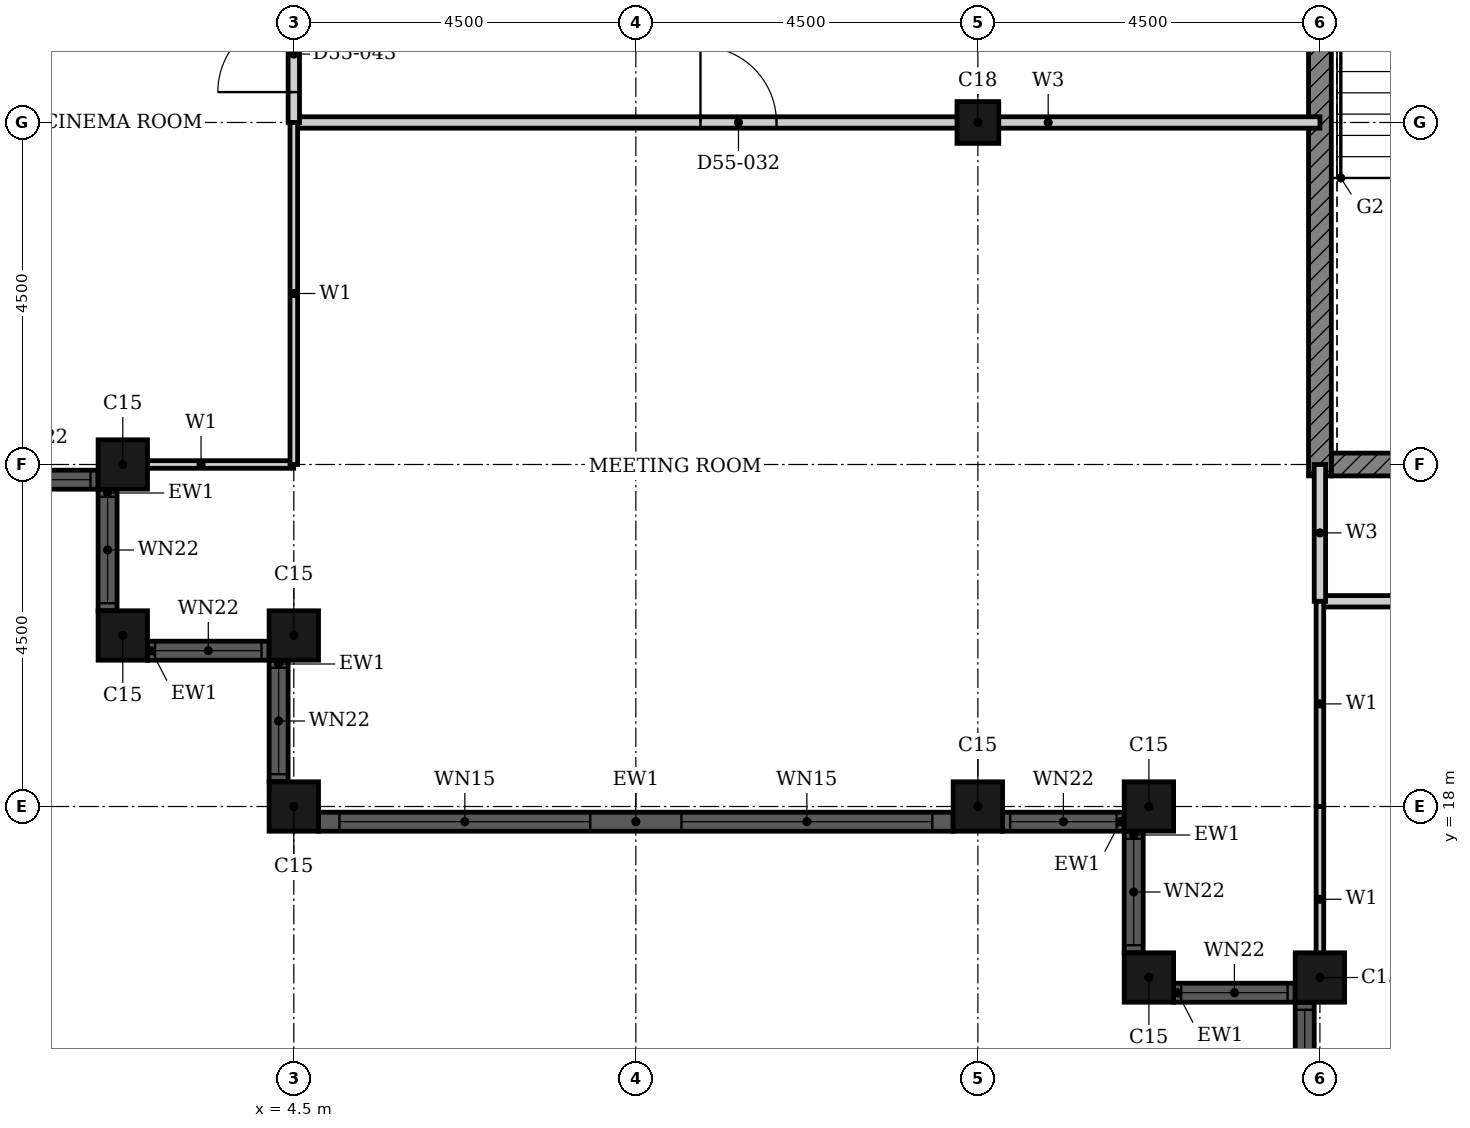
"""IFC4 building model, lengths in metres.
Left out: names, types, materials, properties, quantities, classifications, styles, units other than length and angle.
Written with IfcOpenShell. Run it as: python <this file> out.ifc"""

import sys

from ifc_helpers import new_model, si_unit, direction, frame, frame_2d, origin, origin_2d, place, context, subcontext, project, spatial, rectangle, hollow_rectangle, extrude, element, fill, save


model = new_model("IFC4")
c1 = context("Model", 3, precision=1e-05, world=origin(), true_north=direction((0.0, 1.0)))
c2 = subcontext(c1, "Body", "Model", "MODEL_VIEW")
j1 = project(units=[si_unit("LENGTHUNIT", "METRE"), si_unit("PLANEANGLEUNIT", "RADIAN")], contexts=[c1])
p1 = place(None, origin())
s1 = spatial("IfcSite", under=j1, at=p1, CompositionType="ELEMENT")
p2 = place(p1, origin())
s2 = spatial("IfcBuilding", under=s1, at=p2, CompositionType="ELEMENT")
p3 = place(p2, frame((0.0, 0.0, 218.3)))
s3 = spatial("IfcBuildingStorey", under=s2, at=p3, CompositionType="ELEMENT", Elevation=218.3)
for number, where, z_axis, x_axis in (
    (1, (2.25, 22.5, 0.0), (0.0, 0.0, 1.0), (1.0, 0.0, 0.0)),
    (2, (2.25, 20.25, 0.0), (0.0, 0.0, 1.0), (1.0, 0.0, 0.0)),
    (3, (4.5, 20.25, 0.0), (0.0, 0.0, 1.0), (1.0, 0.0, 0.0)),
    (4, (4.5, 18.0, 0.0), (0.0, 0.0, 1.0), (1.0, 0.0, 0.0)),
    (5, (13.5, 18.0, 0.0), (0.0, 0.0, 1.0), (1.0, 0.0, 0.0)),
    (6, (15.75, 18.0, 0.0), (0.0, 0.0, 1.0), (1.0, 0.0, 0.0)),
    (7, (15.75, 15.75, 0.0), (0.0, 0.0, 1.0), (1.0, 0.0, 0.0)),
    (8, (18.0, 15.75, 0.0), (0.0, 0.0, 1.0), (1.0, 0.0, 0.0)),
):
    element("IfcColumn", number, at=place(p3, frame(where, z_axis=z_axis, x_axis=x_axis)), inside=s3, PredefinedType="COLUMN", context=c2, shape_type="SweptSolid", body=[
        extrude(hollow_rectangle(XDim=0.65, YDim=0.65, WallThickness=0.021, at=origin_2d()), origin(), (0.0, 0.0, 1.0), 3.7),
    ])
p4 = place(p3, frame((13.5, 27.0, 0.0), z_axis=(0.0, 0.0, 1.0), x_axis=(1.0, 0.0, 0.0)))
e9 = element("IfcColumn", 9, at=p4, inside=s3, PredefinedType="COLUMN", context=c2, shape_type="SweptSolid", body=[
    extrude(hollow_rectangle(XDim=0.55, YDim=0.55, WallThickness=0.018, at=origin_2d()), origin(), (0.0, 0.0, 1.0), 3.7),
])
p5 = place(p3, frame((0.325, 22.3, 0.0), z_axis=(0.0, 0.0, 1.0), x_axis=(1.0, 0.0, 0.0)))
e10 = element("IfcWall", 10, at=p5, inside=s3, PredefinedType="SOLIDWALL", context=c2, shape_type="SweptSolid", body=[
    extrude(rectangle(XDim=1.6, YDim=0.25, at=frame_2d((0.8, 0.0))), origin(), (0.0, 0.0, 1.0), 3.7),
])
p6 = place(p5, frame((0.1, 0.0, 0.9)))
e11 = element("IfcOpeningElement", 11, at=p6, cuts=e10, PredefinedType="OPENING", context=c2, shape_type="SweptSolid", body=[
    extrude(rectangle(XDim=1.4, YDim=1.85, at=frame_2d((0.7, 0.925))), frame((0.0, 0.135, 0.0), z_axis=(0.0, -1.0, 0.0), x_axis=(1.0, 0.0, 0.0)), (0.0, 0.0, 1.0), 0.27),
])
p7 = place(p3, frame((2.05, 22.175, 0.0), z_axis=(0.0, 0.0, 1.0), x_axis=(0.0, -1.0, 0.0)))
e12 = element("IfcWall", 12, at=p7, inside=s3, PredefinedType="SOLIDWALL", context=c2, shape_type="SweptSolid", body=[
    extrude(rectangle(XDim=1.6, YDim=0.25, at=frame_2d((0.8, 0.0))), origin(), (0.0, 0.0, 1.0), 3.7),
])
p8 = place(p7, frame((0.1, 0.0, 0.9)))
e13 = element("IfcOpeningElement", 13, at=p8, cuts=e12, PredefinedType="OPENING", context=c2, shape_type="SweptSolid", body=[
    extrude(rectangle(XDim=1.4, YDim=1.85, at=frame_2d((0.7, 0.925))), frame((0.0, 0.135, 0.0), z_axis=(0.0, -1.0, 0.0), x_axis=(1.0, 0.0, 0.0)), (0.0, 0.0, 1.0), 0.27),
])
p9 = place(p3, frame((2.575, 20.05, 0.0), z_axis=(0.0, 0.0, 1.0), x_axis=(1.0, 0.0, 0.0)))
e14 = element("IfcWall", 14, at=p9, inside=s3, PredefinedType="SOLIDWALL", context=c2, shape_type="SweptSolid", body=[
    extrude(rectangle(XDim=1.6, YDim=0.25, at=frame_2d((0.8, 0.0))), origin(), (0.0, 0.0, 1.0), 3.7),
])
p10 = place(p9, frame((0.1, 0.0, 0.9)))
e15 = element("IfcOpeningElement", 15, at=p10, cuts=e14, PredefinedType="OPENING", context=c2, shape_type="SweptSolid", body=[
    extrude(rectangle(XDim=1.4, YDim=1.85, at=frame_2d((0.7, 0.925))), frame((0.0, 0.135, 0.0), z_axis=(0.0, -1.0, 0.0), x_axis=(1.0, 0.0, 0.0)), (0.0, 0.0, 1.0), 0.27),
])
p11 = place(p3, frame((4.3, 19.925, 0.0), z_axis=(0.0, 0.0, 1.0), x_axis=(0.0, -1.0, 0.0)))
e16 = element("IfcWall", 16, at=p11, inside=s3, PredefinedType="SOLIDWALL", context=c2, shape_type="SweptSolid", body=[
    extrude(rectangle(XDim=1.6, YDim=0.25, at=frame_2d((0.8, 0.0))), origin(), (0.0, 0.0, 1.0), 3.7),
])
p12 = place(p11, frame((0.1, 0.0, 0.9)))
e17 = element("IfcOpeningElement", 17, at=p12, cuts=e16, PredefinedType="OPENING", context=c2, shape_type="SweptSolid", body=[
    extrude(rectangle(XDim=1.4, YDim=1.85, at=frame_2d((0.7, 0.925))), frame((0.0, 0.135, 0.0), z_axis=(0.0, -1.0, 0.0), x_axis=(1.0, 0.0, 0.0)), (0.0, 0.0, 1.0), 0.27),
])
p13 = place(p3, frame((4.825, 17.8, 0.0), z_axis=(0.0, 0.0, 1.0), x_axis=(1.0, 0.0, 0.0)))
e18 = element("IfcWall", 18, at=p13, inside=s3, PredefinedType="SOLIDWALL", context=c2, shape_type="SweptSolid", body=[
    extrude(rectangle(XDim=8.35, YDim=0.25, at=frame_2d((4.175, 0.0))), origin(), (0.0, 0.0, 1.0), 3.7),
])
p14 = place(p13, frame((0.275, 0.0, 0.45)))
e19 = element("IfcOpeningElement", 19, at=p14, cuts=e18, PredefinedType="OPENING", context=c2, shape_type="SweptSolid", body=[
    extrude(rectangle(XDim=3.3, YDim=2.3, at=frame_2d((1.65, 1.15))), frame((0.0, 0.135, 0.0), z_axis=(0.0, -1.0, 0.0), x_axis=(1.0, 0.0, 0.0)), (0.0, 0.0, 1.0), 0.27),
])
p15 = place(p13, frame((4.775, 0.0, 0.45)))
e20 = element("IfcOpeningElement", 20, at=p15, cuts=e18, PredefinedType="OPENING", context=c2, shape_type="SweptSolid", body=[
    extrude(rectangle(XDim=3.3, YDim=2.3, at=frame_2d((1.65, 1.15))), frame((0.0, 0.135, 0.0), z_axis=(0.0, -1.0, 0.0), x_axis=(1.0, 0.0, 0.0)), (0.0, 0.0, 1.0), 0.27),
])
p16 = place(p3, frame((13.825, 17.8, 0.0), z_axis=(0.0, 0.0, 1.0), x_axis=(1.0, 0.0, 0.0)))
e21 = element("IfcWall", 21, at=p16, inside=s3, PredefinedType="SOLIDWALL", context=c2, shape_type="SweptSolid", body=[
    extrude(rectangle(XDim=1.6, YDim=0.25, at=frame_2d((0.8, 0.0))), origin(), (0.0, 0.0, 1.0), 3.7),
])
p17 = place(p16, frame((0.1, 0.0, 0.9)))
e22 = element("IfcOpeningElement", 22, at=p17, cuts=e21, PredefinedType="OPENING", context=c2, shape_type="SweptSolid", body=[
    extrude(rectangle(XDim=1.4, YDim=1.85, at=frame_2d((0.7, 0.925))), frame((0.0, 0.135, 0.0), z_axis=(0.0, -1.0, 0.0), x_axis=(1.0, 0.0, 0.0)), (0.0, 0.0, 1.0), 0.27),
])
p18 = place(p3, frame((15.55, 17.675, 0.0), z_axis=(0.0, 0.0, 1.0), x_axis=(0.0, -1.0, 0.0)))
e23 = element("IfcWall", 23, at=p18, inside=s3, PredefinedType="SOLIDWALL", context=c2, shape_type="SweptSolid", body=[
    extrude(rectangle(XDim=1.6, YDim=0.25, at=frame_2d((0.8, 0.0))), origin(), (0.0, 0.0, 1.0), 3.7),
])
p19 = place(p18, frame((0.1, 0.0, 0.9)))
e24 = element("IfcOpeningElement", 24, at=p19, cuts=e23, PredefinedType="OPENING", context=c2, shape_type="SweptSolid", body=[
    extrude(rectangle(XDim=1.4, YDim=1.85, at=frame_2d((0.7, 0.925))), frame((0.0, 0.135, 0.0), z_axis=(0.0, -1.0, 0.0), x_axis=(1.0, 0.0, 0.0)), (0.0, 0.0, 1.0), 0.27),
])
p20 = place(p3, frame((16.075, 15.55, 0.0), z_axis=(0.0, 0.0, 1.0), x_axis=(1.0, 0.0, 0.0)))
e25 = element("IfcWall", 25, at=p20, inside=s3, PredefinedType="SOLIDWALL", context=c2, shape_type="SweptSolid", body=[
    extrude(rectangle(XDim=1.6, YDim=0.25, at=frame_2d((0.8, 0.0))), origin(), (0.0, 0.0, 1.0), 3.7),
])
p21 = place(p20, frame((0.1, 0.0, 0.9)))
e26 = element("IfcOpeningElement", 26, at=p21, cuts=e25, PredefinedType="OPENING", context=c2, shape_type="SweptSolid", body=[
    extrude(rectangle(XDim=1.4, YDim=1.85, at=frame_2d((0.7, 0.925))), frame((0.0, 0.135, 0.0), z_axis=(0.0, -1.0, 0.0), x_axis=(1.0, 0.0, 0.0)), (0.0, 0.0, 1.0), 0.27),
])
p22 = place(p3, frame((17.8, 15.425, 0.0), z_axis=(0.0, 0.0, 1.0), x_axis=(0.0, -1.0, 0.0)))
e27 = element("IfcWall", 27, at=p22, inside=s3, PredefinedType="SOLIDWALL", context=c2, shape_type="SweptSolid", body=[
    extrude(rectangle(XDim=1.6, YDim=0.25, at=frame_2d((0.8, 0.0))), origin(), (0.0, 0.0, 1.0), 3.7),
])
p23 = place(p22, frame((0.1, 0.0, 0.9)))
e28 = element("IfcOpeningElement", 28, at=p23, cuts=e27, PredefinedType="OPENING", context=c2, shape_type="SweptSolid", body=[
    extrude(rectangle(XDim=1.4, YDim=1.85, at=frame_2d((0.7, 0.925))), frame((0.0, 0.135, 0.0), z_axis=(0.0, -1.0, 0.0), x_axis=(1.0, 0.0, 0.0)), (0.0, 0.0, 1.0), 0.27),
])
p24 = place(p3, frame((18.15, 22.5, 0.0), z_axis=(0.0, 0.0, 1.0), x_axis=(1.0, 0.0, 0.0)))
e29 = element("IfcWall", 29, at=p24, inside=s3, PredefinedType="SHEAR", context=c2, shape_type="SweptSolid", body=[
    extrude(rectangle(XDim=4.225, YDim=0.3, at=frame_2d((2.113, 0.0))), origin(), (0.0, 0.0, 1.0), 3.4),
])
p25 = place(p3, frame((18.0, 22.35, 0.0), z_axis=(0.0, 0.0, 1.0), x_axis=(0.0, 1.0, 0.0)))
e30 = element("IfcWall", 30, at=p25, inside=s3, PredefinedType="SHEAR", context=c2, shape_type="SweptSolid", body=[
    extrude(rectangle(XDim=9.3, YDim=0.3, at=frame_2d((4.65, 0.0))), origin(), (0.0, 0.0, 1.0), 3.4),
])
p26 = place(p3, frame((18.0, 20.7, 0.0), z_axis=(0.0, 0.0, 1.0), x_axis=(1.0, 0.0, 0.0)))
e31 = element("IfcWall", 31, at=p26, inside=s3, PredefinedType="PARTITIONING", context=c2, shape_type="SweptSolid", body=[
    extrude(rectangle(XDim=13.5, YDim=0.15, at=frame_2d((6.75, 0.0))), origin(), (0.0, 0.0, 1.0), 3.4),
])
p27 = place(p26, frame((6.25, 0.0, 0.0)))
e32 = element("IfcOpeningElement", 32, at=p27, cuts=e31, PredefinedType="OPENING", context=c2, shape_type="SweptSolid", body=[
    extrude(rectangle(XDim=1.0, YDim=2.1, at=frame_2d((0.5, 1.05))), frame((0.0, 0.085, 0.0), z_axis=(0.0, -1.0, 0.0), x_axis=(1.0, 0.0, 0.0)), (0.0, 0.0, 1.0), 0.17),
])
p28 = place(p3, frame((4.5, 27.0, 0.0), z_axis=(0.0, 0.0, 1.0), x_axis=(1.0, 0.0, 0.0)))
e33 = element("IfcWall", 33, at=p28, inside=s3, PredefinedType="PARTITIONING", context=c2, shape_type="SweptSolid", body=[
    extrude(rectangle(XDim=13.5, YDim=0.15, at=frame_2d((6.75, 0.0))), origin(), (0.0, 0.0, 1.0), 2.68),
])
p29 = place(p28, frame((5.35, 0.0, 0.0)))
e34 = element("IfcOpeningElement", 34, at=p29, cuts=e33, PredefinedType="OPENING", context=c2, shape_type="SweptSolid", body=[
    extrude(rectangle(XDim=1.0, YDim=2.1, at=frame_2d((0.5, 1.05))), frame((0.0, 0.085, 0.0), z_axis=(0.0, -1.0, 0.0), x_axis=(1.0, 0.0, 0.0)), (0.0, 0.0, 1.0), 0.17),
])
p30 = place(p3, frame((18.0, 20.7, 0.0), z_axis=(0.0, 0.0, 1.0), x_axis=(0.0, 1.0, 0.0)))
e35 = element("IfcWall", 35, at=p30, inside=s3, PredefinedType="PARTITIONING", context=c2, shape_type="SweptSolid", body=[
    extrude(rectangle(XDim=1.8, YDim=0.15, at=frame_2d((0.9, 0.0))), origin(), (0.0, 0.0, 1.0), 3.4),
])
p31 = place(p3, frame((4.5, 27.0, 0.0), z_axis=(0.0, 0.0, 1.0), x_axis=(0.0, 1.0, 0.0)))
e36 = element("IfcWall", 36, at=p31, inside=s3, PredefinedType="PARTITIONING", context=c2, shape_type="SweptSolid", body=[
    extrude(rectangle(XDim=1.8, YDim=0.15, at=frame_2d((0.9, 0.0))), origin(), (0.0, 0.0, 1.0), 3.4),
])
p32 = place(p31, frame((0.4, 0.0, 0.0)))
e37 = element("IfcOpeningElement", 37, at=p32, cuts=e36, PredefinedType="OPENING", context=c2, shape_type="SweptSolid", body=[
    extrude(rectangle(XDim=1.0, YDim=2.1, at=frame_2d((0.5, 1.05))), frame((0.0, 0.085, 0.0), z_axis=(0.0, -1.0, 0.0), x_axis=(1.0, 0.0, 0.0)), (0.0, 0.0, 1.0), 0.17),
])
p33 = place(p3, frame((2.06, 22.5, 0.0), z_axis=(0.0, 0.0, 1.0), x_axis=(1.0, 0.0, 0.0)))
e38 = element("IfcWall", 38, at=p33, inside=s3, PredefinedType="PARTITIONING", context=c2, shape_type="SweptSolid", body=[
    extrude(rectangle(XDim=2.439, YDim=0.1, at=frame_2d((1.219, 0.0))), origin(), (0.0, 0.0, 1.0), 2.68),
])
p34 = place(p3, frame((18.0, 15.56, 0.0), z_axis=(0.0, 0.0, 1.0), x_axis=(0.0, 1.0, 0.0)))
e39 = element("IfcWall", 39, at=p34, inside=s3, PredefinedType="PARTITIONING", context=c2, shape_type="SweptSolid", body=[
    extrude(rectangle(XDim=2.439, YDim=0.1, at=frame_2d((1.219, 0.0))), origin(), (0.0, 0.0, 1.0), 3.4),
])
p35 = place(p3, frame((18.0, 18.0, 0.0), z_axis=(0.0, 0.0, 1.0), x_axis=(0.0, 1.0, 0.0)))
e40 = element("IfcWall", 40, at=p35, inside=s3, PredefinedType="PARTITIONING", context=c2, shape_type="SweptSolid", body=[
    extrude(rectangle(XDim=2.7, YDim=0.1, at=frame_2d((1.35, 0.0))), origin(), (0.0, 0.0, 1.0), 3.4),
])
p36 = place(p3, frame((4.5, 22.5, 0.0), z_axis=(0.0, 0.0, 1.0), x_axis=(0.0, 1.0, 0.0)))
e41 = element("IfcWall", 41, at=p36, inside=s3, PredefinedType="PARTITIONING", context=c2, shape_type="SweptSolid", body=[
    extrude(rectangle(XDim=4.5, YDim=0.1, at=frame_2d((2.25, 0.0))), origin(), (0.0, 0.0, 1.0), 3.4),
])
p37 = place(p6, origin())
e42 = element("IfcWindow", 42, at=p37, inside=s3, PartitioningType="SINGLE_PANEL", PredefinedType="WINDOW", context=c2, shape_type="SweptSolid", body=[
    extrude(rectangle(XDim=1.4, YDim=1.85, at=frame_2d((0.7, 0.925))), frame((0.0, 0.03, 0.0), z_axis=(0.0, -1.0, 0.0), x_axis=(1.0, 0.0, 0.0)), (0.0, 0.0, 1.0), 0.06),
])
fill(e11, e42)
p38 = place(p8, origin())
e43 = element("IfcWindow", 43, at=p38, inside=s3, PartitioningType="SINGLE_PANEL", PredefinedType="WINDOW", context=c2, shape_type="SweptSolid", body=[
    extrude(rectangle(XDim=1.4, YDim=1.85, at=frame_2d((0.7, 0.925))), frame((0.0, 0.03, 0.0), z_axis=(0.0, -1.0, 0.0), x_axis=(1.0, 0.0, 0.0)), (0.0, 0.0, 1.0), 0.06),
])
fill(e13, e43)
p39 = place(p10, origin())
e44 = element("IfcWindow", 44, at=p39, inside=s3, PartitioningType="SINGLE_PANEL", PredefinedType="WINDOW", context=c2, shape_type="SweptSolid", body=[
    extrude(rectangle(XDim=1.4, YDim=1.85, at=frame_2d((0.7, 0.925))), frame((0.0, 0.03, 0.0), z_axis=(0.0, -1.0, 0.0), x_axis=(1.0, 0.0, 0.0)), (0.0, 0.0, 1.0), 0.06),
])
fill(e15, e44)
p40 = place(p12, origin())
e45 = element("IfcWindow", 45, at=p40, inside=s3, PartitioningType="SINGLE_PANEL", PredefinedType="WINDOW", context=c2, shape_type="SweptSolid", body=[
    extrude(rectangle(XDim=1.4, YDim=1.85, at=frame_2d((0.7, 0.925))), frame((0.0, 0.03, 0.0), z_axis=(0.0, -1.0, 0.0), x_axis=(1.0, 0.0, 0.0)), (0.0, 0.0, 1.0), 0.06),
])
fill(e17, e45)
p41 = place(p14, origin())
e46 = element("IfcWindow", 46, at=p41, inside=s3, PartitioningType="SINGLE_PANEL", PredefinedType="WINDOW", context=c2, shape_type="SweptSolid", body=[
    extrude(rectangle(XDim=3.3, YDim=2.3, at=frame_2d((1.65, 1.15))), frame((0.0, 0.03, 0.0), z_axis=(0.0, -1.0, 0.0), x_axis=(1.0, 0.0, 0.0)), (0.0, 0.0, 1.0), 0.06),
])
fill(e19, e46)
p42 = place(p15, origin())
e47 = element("IfcWindow", 47, at=p42, inside=s3, PartitioningType="SINGLE_PANEL", PredefinedType="WINDOW", context=c2, shape_type="SweptSolid", body=[
    extrude(rectangle(XDim=3.3, YDim=2.3, at=frame_2d((1.65, 1.15))), frame((0.0, 0.03, 0.0), z_axis=(0.0, -1.0, 0.0), x_axis=(1.0, 0.0, 0.0)), (0.0, 0.0, 1.0), 0.06),
])
fill(e20, e47)
p43 = place(p17, origin())
e48 = element("IfcWindow", 48, at=p43, inside=s3, PartitioningType="SINGLE_PANEL", PredefinedType="WINDOW", context=c2, shape_type="SweptSolid", body=[
    extrude(rectangle(XDim=1.4, YDim=1.85, at=frame_2d((0.7, 0.925))), frame((0.0, 0.03, 0.0), z_axis=(0.0, -1.0, 0.0), x_axis=(1.0, 0.0, 0.0)), (0.0, 0.0, 1.0), 0.06),
])
fill(e22, e48)
p44 = place(p19, origin())
e49 = element("IfcWindow", 49, at=p44, inside=s3, PartitioningType="SINGLE_PANEL", PredefinedType="WINDOW", context=c2, shape_type="SweptSolid", body=[
    extrude(rectangle(XDim=1.4, YDim=1.85, at=frame_2d((0.7, 0.925))), frame((0.0, 0.03, 0.0), z_axis=(0.0, -1.0, 0.0), x_axis=(1.0, 0.0, 0.0)), (0.0, 0.0, 1.0), 0.06),
])
fill(e24, e49)
p45 = place(p21, origin())
e50 = element("IfcWindow", 50, at=p45, inside=s3, PartitioningType="SINGLE_PANEL", PredefinedType="WINDOW", context=c2, shape_type="SweptSolid", body=[
    extrude(rectangle(XDim=1.4, YDim=1.85, at=frame_2d((0.7, 0.925))), frame((0.0, 0.03, 0.0), z_axis=(0.0, -1.0, 0.0), x_axis=(1.0, 0.0, 0.0)), (0.0, 0.0, 1.0), 0.06),
])
fill(e26, e50)
p46 = place(p23, origin())
e51 = element("IfcWindow", 51, at=p46, inside=s3, PartitioningType="SINGLE_PANEL", PredefinedType="WINDOW", context=c2, shape_type="SweptSolid", body=[
    extrude(rectangle(XDim=1.4, YDim=1.85, at=frame_2d((0.7, 0.925))), frame((0.0, 0.03, 0.0), z_axis=(0.0, -1.0, 0.0), x_axis=(1.0, 0.0, 0.0)), (0.0, 0.0, 1.0), 0.06),
])
fill(e28, e51)
p47 = place(p29, origin())
e52 = element("IfcDoor", 52, at=p47, inside=s3, OperationType="SINGLE_SWING_LEFT", PredefinedType="DOOR", context=c2, shape_type="SweptSolid", body=[
    extrude(rectangle(XDim=1.0, YDim=2.1, at=frame_2d((0.5, 1.05))), frame((0.0, 0.025, 0.0), z_axis=(0.0, -1.0, 0.0), x_axis=(1.0, 0.0, 0.0)), (0.0, 0.0, 1.0), 0.05),
])
fill(e34, e52)
p48 = place(p32, origin())
e53 = element("IfcDoor", 53, at=p48, inside=s3, OperationType="SINGLE_SWING_RIGHT", PredefinedType="DOOR", context=c2, shape_type="SweptSolid", body=[
    extrude(rectangle(XDim=1.0, YDim=2.1, at=frame_2d((0.5, 1.05))), frame((0.0, 0.025, 0.0), z_axis=(0.0, -1.0, 0.0), x_axis=(1.0, 0.0, 0.0)), (0.0, 0.0, 1.0), 0.05),
])
fill(e37, e53)
save(model, sys.argv[1])
